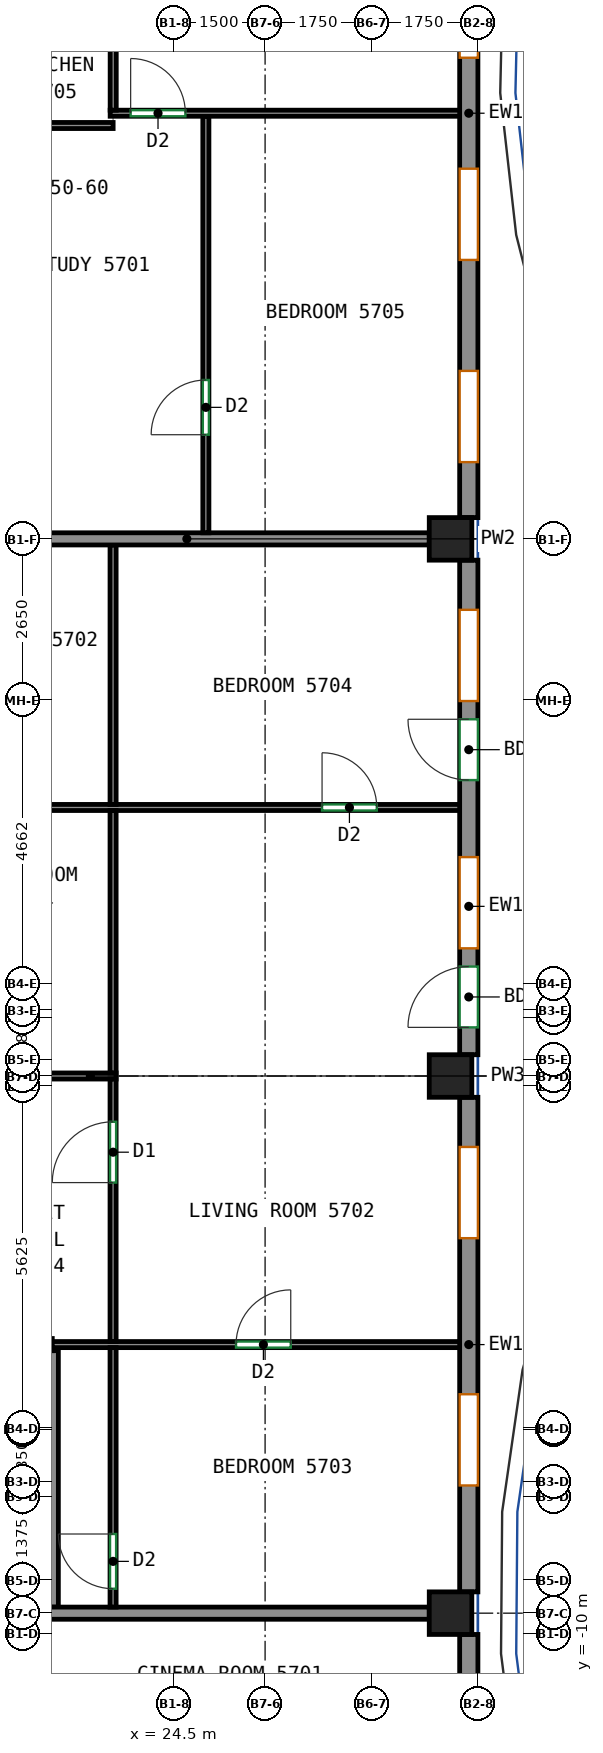
"""IFC4 building model, lengths in metres.
Left out: names, types, materials, properties, quantities, classifications, styles, units other than length and angle.
Written with IfcOpenShell. Run it as: python <this file> out.ifc"""

import sys

from ifc_helpers import new_model, si_unit, direction, frame, frame_2d, origin, origin_2d, place, context, subcontext, project, spatial, rectangle, extrude, source, transform, mapped, element, fill, save


model = new_model("IFC4")
c1 = context("Model", 3, precision=1e-05, world=origin(), true_north=direction((0.0, 1.0)))
c2 = subcontext(c1, "Body", "Model", "MODEL_VIEW")
j1 = project(units=[si_unit("LENGTHUNIT", "METRE"), si_unit("PLANEANGLEUNIT", "RADIAN")], contexts=[c1])
p1 = place(None, origin())
s1 = spatial("IfcSite", under=j1, at=p1, CompositionType="ELEMENT")
p2 = place(p1, origin())
s2 = spatial("IfcBuilding", under=s1, at=p2, CompositionType="ELEMENT")
p3 = place(p2, frame((0.0, 0.0, 239.0)))
s3 = spatial("IfcBuildingStorey", under=s2, at=p3, CompositionType="ELEMENT", Elevation=239.0)
m1 = source(origin(), c2, "Body", "SweptSolid", [
    extrude(rectangle(XDim=0.7, YDim=0.7, at=origin_2d()), origin(), (0.0, 0.0, 1.0), 3.12),
])
for number, where, z_axis, x_axis in (
    (1, (29.05, -9.667, 0.0), (0.0, 0.0, 1.0), (1.0, 0.0, 0.0)),
    (2, (29.05, -0.833, 0.0), (0.0, 0.0, 1.0), (1.0, 0.0, 0.0)),
    (3, (29.05, 8.0, 0.0), (0.0, 0.0, 1.0), (1.0, 0.0, 0.0)),
):
    element("IfcColumn", number, at=place(p3, frame(where, z_axis=z_axis, x_axis=x_axis)), inside=s3, PredefinedType="COLUMN", context=c2, shape_type="MappedRepresentation", body=[
        mapped(m1, transform((0.0, 0.0, 0.0))),
    ])
m2 = source(origin(), c2, "Body", "SweptSolid", [
    extrude(rectangle(XDim=4.315, YDim=0.3, at=frame_2d((2.158, 0.0))), origin(), (0.0, 0.0, 1.0), 3.12),
])
p4 = place(p3, frame((29.35, -14.332, 0.0), z_axis=(0.0, 0.0, 1.0), x_axis=(0.0, 1.0, 0.0)))
e4 = element("IfcWall", 4, at=p4, inside=s3, PredefinedType="SOLIDWALL", context=c2, shape_type="MappedRepresentation", body=[
    mapped(m2, transform((0.0, 0.0, 0.0))),
])
p5 = place(p4, frame((1.75, 0.0, 0.8)))
e5 = element("IfcOpeningElement", 5, at=p5, cuts=e4, PredefinedType="OPENING", context=c2, shape_type="SweptSolid", body=[
    extrude(rectangle(XDim=1.5, YDim=2.05, at=frame_2d((0.75, 1.025))), frame((0.0, 0.16, 0.0), z_axis=(0.0, -1.0, 0.0), x_axis=(1.0, 0.0, 0.0)), (0.0, 0.0, 1.0), 0.32),
])
m3 = source(origin(), c2, "Body", "SweptSolid", [
    extrude(rectangle(XDim=8.133, YDim=0.3, at=frame_2d((4.067, 0.0))), origin(), (0.0, 0.0, 1.0), 3.12),
])
p6 = place(p3, frame((29.35, -9.317, 0.0), z_axis=(0.0, 0.0, 1.0), x_axis=(0.0, 1.0, 0.0)))
e6 = element("IfcWall", 6, at=p6, inside=s3, PredefinedType="SOLIDWALL", context=c2, shape_type="MappedRepresentation", body=[
    mapped(m3, transform((0.0, 0.0, 0.0))),
])
p7 = place(p6, frame((1.75, 0.0, 0.8)))
e7 = element("IfcOpeningElement", 7, at=p7, cuts=e6, PredefinedType="OPENING", context=c2, shape_type="SweptSolid", body=[
    extrude(rectangle(XDim=1.5, YDim=2.05, at=frame_2d((0.75, 1.025))), frame((0.0, 0.16, 0.0), z_axis=(0.0, -1.0, 0.0), x_axis=(1.0, 0.0, 0.0)), (0.0, 0.0, 1.0), 0.32),
])
p8 = place(p6, frame((5.817, 0.0, 0.8)))
e8 = element("IfcOpeningElement", 8, at=p8, cuts=e6, PredefinedType="OPENING", context=c2, shape_type="SweptSolid", body=[
    extrude(rectangle(XDim=1.5, YDim=2.05, at=frame_2d((0.75, 1.025))), frame((0.0, 0.16, 0.0), z_axis=(0.0, -1.0, 0.0), x_axis=(1.0, 0.0, 0.0)), (0.0, 0.0, 1.0), 0.32),
])
p9 = place(p3, frame((29.35, -0.483, 0.0), z_axis=(0.0, 0.0, 1.0), x_axis=(0.0, 1.0, 0.0)))
e9 = element("IfcWall", 9, at=p9, inside=s3, PredefinedType="SOLIDWALL", context=c2, shape_type="MappedRepresentation", body=[
    mapped(m3, transform((0.0, 0.0, 0.0))),
])
p10 = place(p9, frame((1.75, 0.0, 0.8)))
e10 = element("IfcOpeningElement", 10, at=p10, cuts=e9, PredefinedType="OPENING", context=c2, shape_type="SweptSolid", body=[
    extrude(rectangle(XDim=1.5, YDim=2.05, at=frame_2d((0.75, 1.025))), frame((0.0, 0.16, 0.0), z_axis=(0.0, -1.0, 0.0), x_axis=(1.0, 0.0, 0.0)), (0.0, 0.0, 1.0), 0.32),
])
p11 = place(p9, frame((0.45, 0.0, 0.0)))
e11 = element("IfcOpeningElement", 11, at=p11, cuts=e9, PredefinedType="OPENING", context=c2, shape_type="SweptSolid", body=[
    extrude(rectangle(XDim=1.0, YDim=2.1, at=frame_2d((0.5, 1.05))), frame((0.0, 0.16, 0.0), z_axis=(0.0, -1.0, 0.0), x_axis=(1.0, 0.0, 0.0)), (0.0, 0.0, 1.0), 0.32),
])
p12 = place(p9, frame((5.817, 0.0, 0.8)))
e12 = element("IfcOpeningElement", 12, at=p12, cuts=e9, PredefinedType="OPENING", context=c2, shape_type="SweptSolid", body=[
    extrude(rectangle(XDim=1.5, YDim=2.05, at=frame_2d((0.75, 1.025))), frame((0.0, 0.16, 0.0), z_axis=(0.0, -1.0, 0.0), x_axis=(1.0, 0.0, 0.0)), (0.0, 0.0, 1.0), 0.32),
])
p13 = place(p9, frame((4.517, 0.0, 0.0)))
e13 = element("IfcOpeningElement", 13, at=p13, cuts=e9, PredefinedType="OPENING", context=c2, shape_type="SweptSolid", body=[
    extrude(rectangle(XDim=1.0, YDim=2.1, at=frame_2d((0.5, 1.05))), frame((0.0, 0.16, 0.0), z_axis=(0.0, -1.0, 0.0), x_axis=(1.0, 0.0, 0.0)), (0.0, 0.0, 1.0), 0.32),
])
m4 = source(origin(), c2, "Body", "SweptSolid", [
    extrude(rectangle(XDim=13.3, YDim=0.3, at=frame_2d((6.65, 0.0))), origin(), (0.0, 0.0, 1.0), 3.12),
])
p14 = place(p3, frame((29.35, 8.35, 0.0), z_axis=(0.0, 0.0, 1.0), x_axis=(0.0, 1.0, 0.0)))
e14 = element("IfcWall", 14, at=p14, inside=s3, PredefinedType="SOLIDWALL", context=c2, shape_type="MappedRepresentation", body=[
    mapped(m4, transform((0.0, 0.0, 0.0))),
])
p15 = place(p14, frame((0.913, 0.0, 0.8)))
e15 = element("IfcOpeningElement", 15, at=p15, cuts=e14, PredefinedType="OPENING", context=c2, shape_type="SweptSolid", body=[
    extrude(rectangle(XDim=1.5, YDim=2.05, at=frame_2d((0.75, 1.025))), frame((0.0, 0.16, 0.0), z_axis=(0.0, -1.0, 0.0), x_axis=(1.0, 0.0, 0.0)), (0.0, 0.0, 1.0), 0.32),
])
p16 = place(p14, frame((4.238, 0.0, 0.8)))
e16 = element("IfcOpeningElement", 16, at=p16, cuts=e14, PredefinedType="OPENING", context=c2, shape_type="SweptSolid", body=[
    extrude(rectangle(XDim=1.5, YDim=2.05, at=frame_2d((0.75, 1.025))), frame((0.0, 0.16, 0.0), z_axis=(0.0, -1.0, 0.0), x_axis=(1.0, 0.0, 0.0)), (0.0, 0.0, 1.0), 0.32),
])
p17 = place(p14, frame((7.562, 0.0, 0.8)))
e17 = element("IfcOpeningElement", 17, at=p17, cuts=e14, PredefinedType="OPENING", context=c2, shape_type="SweptSolid", body=[
    extrude(rectangle(XDim=1.5, YDim=2.05, at=frame_2d((0.75, 1.025))), frame((0.0, 0.16, 0.0), z_axis=(0.0, -1.0, 0.0), x_axis=(1.0, 0.0, 0.0)), (0.0, 0.0, 1.0), 0.32),
])
p18 = place(p14, frame((10.887, 0.0, 0.8)))
e18 = element("IfcOpeningElement", 18, at=p18, cuts=e14, PredefinedType="OPENING", context=c2, shape_type="SweptSolid", body=[
    extrude(rectangle(XDim=1.5, YDim=2.05, at=frame_2d((0.75, 1.025))), frame((0.0, 0.16, 0.0), z_axis=(0.0, -1.0, 0.0), x_axis=(1.0, 0.0, 0.0)), (0.0, 0.0, 1.0), 0.32),
])
p19 = place(p3, frame((22.5, -9.567, 0.0), z_axis=(0.0, 0.0, 1.0), x_axis=(0.0, 1.0, 0.0)))
e19 = element("IfcWall", 19, at=p19, inside=s3, PredefinedType="PARTITIONING", context=c2, shape_type="SweptSolid", body=[
    extrude(rectangle(XDim=4.217, YDim=0.2, at=frame_2d((2.108, 0.0))), origin(), (0.0, 0.0, 1.0), 3.12),
])
p20 = place(p3, frame((22.4, -9.667, 0.0), z_axis=(0.0, 0.0, 1.0), x_axis=(1.0, 0.0, 0.0)))
e20 = element("IfcWall", 20, at=p20, inside=s3, PredefinedType="PARTITIONING", context=c2, shape_type="SweptSolid", body=[
    extrude(rectangle(XDim=6.3, YDim=0.2, at=frame_2d((3.15, 0.0))), origin(), (0.0, 0.0, 1.0), 3.12),
])
p21 = place(p3, frame((22.5, -5.25, 0.0), z_axis=(0.0, 0.0, 1.0), x_axis=(1.0, 0.0, 0.0)))
e21 = element("IfcWall", 21, at=p21, inside=s3, PredefinedType="PARTITIONING", context=c2, shape_type="SweptSolid", body=[
    extrude(rectangle(XDim=6.75, YDim=0.1, at=frame_2d((3.375, 0.0))), origin(), (0.0, 0.0, 1.0), 3.12),
])
p22 = place(p21, frame((3.022, 0.0, 0.0)))
e22 = element("IfcOpeningElement", 22, at=p22, cuts=e21, PredefinedType="OPENING", context=c2, shape_type="SweptSolid", body=[
    extrude(rectangle(XDim=0.9, YDim=2.1, at=frame_2d((0.45, 1.05))), frame((0.0, 0.06, 0.0), z_axis=(0.0, -1.0, 0.0), x_axis=(1.0, 0.0, 0.0)), (0.0, 0.0, 1.0), 0.12),
])
p23 = place(p3, frame((23.5, -9.567, 0.0), z_axis=(0.0, 0.0, 1.0), x_axis=(0.0, 1.0, 0.0)))
e23 = element("IfcWall", 23, at=p23, inside=s3, PredefinedType="PARTITIONING", context=c2, shape_type="SweptSolid", body=[
    extrude(rectangle(XDim=4.267, YDim=0.1, at=frame_2d((2.133, 0.0))), origin(), (0.0, 0.0, 1.0), 3.12),
])
p24 = place(p23, frame((0.302, 0.0, 0.0)))
e24 = element("IfcOpeningElement", 24, at=p24, cuts=e23, PredefinedType="OPENING", context=c2, shape_type="SweptSolid", body=[
    extrude(rectangle(XDim=0.9, YDim=2.1, at=frame_2d((0.45, 1.05))), frame((0.0, 0.06, 0.0), z_axis=(0.0, -1.0, 0.0), x_axis=(1.0, 0.0, 0.0)), (0.0, 0.0, 1.0), 0.12),
])
p25 = place(p3, frame((23.55, -0.833, 0.0), z_axis=(0.0, 0.0, 1.0), x_axis=(-1.0, 0.0, 0.0)))
e25 = element("IfcWall", 25, at=p25, inside=s3, PredefinedType="PARTITIONING", context=c2, shape_type="SweptSolid", body=[
    extrude(rectangle(XDim=2.823, YDim=0.1, at=frame_2d((1.412, 0.0))), origin(), (0.0, 0.0, 1.0), 2.57),
])
p26 = place(p25, frame((1.216, 0.0, 0.0)))
e26 = element("IfcOpeningElement", 26, at=p26, cuts=e25, PredefinedType="OPENING", context=c2, shape_type="SweptSolid", body=[
    extrude(rectangle(XDim=1.0, YDim=2.1, at=frame_2d((0.5, 1.05))), frame((0.0, 0.06, 0.0), z_axis=(0.0, -1.0, 0.0), x_axis=(1.0, 0.0, 0.0)), (0.0, 0.0, 1.0), 0.12),
])
p27 = place(p3, frame((23.5, -5.2, 0.0), z_axis=(0.0, 0.0, 1.0), x_axis=(0.0, 1.0, 0.0)))
e27 = element("IfcWall", 27, at=p27, inside=s3, PredefinedType="PARTITIONING", context=c2, shape_type="SweptSolid", body=[
    extrude(rectangle(XDim=4.317, YDim=0.1, at=frame_2d((2.158, 0.0))), origin(), (0.0, 0.0, 1.0), 3.12),
])
p28 = place(p27, frame((2.614, 0.0, 0.0)))
e28 = element("IfcOpeningElement", 28, at=p28, cuts=e27, PredefinedType="OPENING", context=c2, shape_type="SweptSolid", body=[
    extrude(rectangle(XDim=1.0, YDim=2.1, at=frame_2d((0.5, 1.05))), frame((0.0, 0.06, 0.0), z_axis=(0.0, -1.0, 0.0), x_axis=(1.0, 0.0, 0.0)), (0.0, 0.0, 1.0), 0.12),
])
p29 = place(p3, frame((20.727, 3.583, 0.0), z_axis=(0.0, 0.0, 1.0), x_axis=(1.0, 0.0, 0.0)))
e29 = element("IfcWall", 29, at=p29, inside=s3, PredefinedType="PARTITIONING", context=c2, shape_type="SweptSolid", body=[
    extrude(rectangle(XDim=8.523, YDim=0.1, at=frame_2d((4.261, 0.0))), origin(), (0.0, 0.0, 1.0), 3.12),
])
p30 = place(p29, frame((0.41, 0.0, 0.0)))
e30 = element("IfcOpeningElement", 30, at=p30, cuts=e29, PredefinedType="OPENING", context=c2, shape_type="SweptSolid", body=[
    extrude(rectangle(XDim=0.9, YDim=2.1, at=frame_2d((0.45, 1.05))), frame((0.0, 0.06, 0.0), z_axis=(0.0, -1.0, 0.0), x_axis=(1.0, 0.0, 0.0)), (0.0, 0.0, 1.0), 0.12),
])
p31 = place(p29, frame((6.21, 0.0, 0.0)))
e31 = element("IfcOpeningElement", 31, at=p31, cuts=e29, PredefinedType="OPENING", context=c2, shape_type="SweptSolid", body=[
    extrude(rectangle(XDim=0.9, YDim=2.1, at=frame_2d((0.45, 1.05))), frame((0.0, 0.06, 0.0), z_axis=(0.0, -1.0, 0.0), x_axis=(1.0, 0.0, 0.0)), (0.0, 0.0, 1.0), 0.12),
])
p32 = place(p3, frame((23.5, -0.783, 0.0), z_axis=(0.0, 0.0, 1.0), x_axis=(0.0, 1.0, 0.0)))
e32 = element("IfcWall", 32, at=p32, inside=s3, PredefinedType="PARTITIONING", context=c2, shape_type="SweptSolid", body=[
    extrude(rectangle(XDim=4.316, YDim=0.1, at=frame_2d((2.158, 0.0))), origin(), (0.0, 0.0, 1.0), 3.12),
])
p33 = place(p3, frame((23.5, 3.633, 0.0), z_axis=(0.0, 0.0, 1.0), x_axis=(0.0, 1.0, 0.0)))
e33 = element("IfcWall", 33, at=p33, inside=s3, PredefinedType="PARTITIONING", context=c2, shape_type="SweptSolid", body=[
    extrude(rectangle(XDim=4.267, YDim=0.1, at=frame_2d((2.133, 0.0))), origin(), (0.0, 0.0, 1.0), 3.12),
])
p34 = place(p3, frame((20.727, 8.0, 0.0), z_axis=(0.0, 0.0, 1.0), x_axis=(1.0, 0.0, 0.0)))
e34 = element("IfcWall", 34, at=p34, inside=s3, PredefinedType="PARTITIONING", context=c2, shape_type="SweptSolid", body=[
    extrude(rectangle(XDim=7.973, YDim=0.2, at=frame_2d((3.986, 0.0))), origin(), (0.0, 0.0, 1.0), 2.57),
])
p35 = place(p3, frame((25.026, 8.1, 0.0), z_axis=(0.0, 0.0, 1.0), x_axis=(0.0, 1.0, 0.0)))
e35 = element("IfcWall", 35, at=p35, inside=s3, PredefinedType="PARTITIONING", context=c2, shape_type="SweptSolid", body=[
    extrude(rectangle(XDim=6.85, YDim=0.1, at=frame_2d((3.425, 0.0))), origin(), (0.0, 0.0, 1.0), 3.12),
])
p36 = place(p35, frame((1.613, 0.0, 0.0)))
e36 = element("IfcOpeningElement", 36, at=p36, cuts=e35, PredefinedType="OPENING", context=c2, shape_type="SweptSolid", body=[
    extrude(rectangle(XDim=0.9, YDim=2.1, at=frame_2d((0.45, 1.05))), frame((0.0, 0.06, 0.0), z_axis=(0.0, -1.0, 0.0), x_axis=(1.0, 0.0, 0.0)), (0.0, 0.0, 1.0), 0.12),
])
p37 = place(p3, frame((23.452, 15.0, 0.0), z_axis=(0.0, 0.0, 1.0), x_axis=(1.0, 0.0, 0.0)))
e37 = element("IfcWall", 37, at=p37, inside=s3, PredefinedType="PARTITIONING", context=c2, shape_type="SweptSolid", body=[
    extrude(rectangle(XDim=5.798, YDim=0.1, at=frame_2d((2.899, 0.0))), origin(), (0.0, 0.0, 1.0), 3.12),
])
p38 = place(p37, frame((0.337, 0.0, 0.0)))
e38 = element("IfcOpeningElement", 38, at=p38, cuts=e37, PredefinedType="OPENING", context=c2, shape_type="SweptSolid", body=[
    extrude(rectangle(XDim=0.9, YDim=2.1, at=frame_2d((0.45, 1.05))), frame((0.0, 0.06, 0.0), z_axis=(0.0, -1.0, 0.0), x_axis=(1.0, 0.0, 0.0)), (0.0, 0.0, 1.0), 0.12),
])
p39 = place(p3, frame((23.501, 14.798, 0.0), z_axis=(0.0, 0.0, 1.0), x_axis=(-1.0, 0.0, 0.0)))
e39 = element("IfcWall", 39, at=p39, inside=s3, PredefinedType="PARTITIONING", context=c2, shape_type="SweptSolid", body=[
    extrude(rectangle(XDim=1.801, YDim=0.1, at=frame_2d((0.9, 0.0))), origin(), (0.0, 0.0, 1.0), 3.12),
])
p40 = place(p3, frame((23.502, 15.05, 0.0), z_axis=(0.0, 0.0, 1.0), x_axis=(0.0, 1.0, 0.0)))
e40 = element("IfcWall", 40, at=p40, inside=s3, PredefinedType="PARTITIONING", context=c2, shape_type="SweptSolid", body=[
    extrude(rectangle(XDim=2.158, YDim=0.1, at=frame_2d((1.079, 0.0))), origin(), (0.0, 0.0, 1.0), 3.12),
])
p41 = place(p7, origin())
e41 = element("IfcWindow", 41, at=p41, inside=s3, PartitioningType="SINGLE_PANEL", PredefinedType="WINDOW", context=c2, shape_type="SweptSolid", body=[
    extrude(rectangle(XDim=1.5, YDim=2.05, at=frame_2d((0.75, 1.025))), frame((0.0, 0.03, 0.0), z_axis=(0.0, -1.0, 0.0), x_axis=(1.0, 0.0, 0.0)), (0.0, 0.0, 1.0), 0.06),
])
fill(e7, e41)
p42 = place(p8, origin())
e42 = element("IfcWindow", 42, at=p42, inside=s3, PartitioningType="SINGLE_PANEL", PredefinedType="WINDOW", context=c2, shape_type="SweptSolid", body=[
    extrude(rectangle(XDim=1.5, YDim=2.05, at=frame_2d((0.75, 1.025))), frame((0.0, 0.03, 0.0), z_axis=(0.0, -1.0, 0.0), x_axis=(1.0, 0.0, 0.0)), (0.0, 0.0, 1.0), 0.06),
])
fill(e8, e42)
p43 = place(p10, origin())
e43 = element("IfcWindow", 43, at=p43, inside=s3, PartitioningType="SINGLE_PANEL", PredefinedType="WINDOW", context=c2, shape_type="SweptSolid", body=[
    extrude(rectangle(XDim=1.5, YDim=2.05, at=frame_2d((0.75, 1.025))), frame((0.0, 0.03, 0.0), z_axis=(0.0, -1.0, 0.0), x_axis=(1.0, 0.0, 0.0)), (0.0, 0.0, 1.0), 0.06),
])
fill(e10, e43)
p44 = place(p11, origin())
e44 = element("IfcDoor", 44, at=p44, inside=s3, OperationType="SINGLE_SWING_LEFT", PredefinedType="DOOR", context=c2, shape_type="SweptSolid", body=[
    extrude(rectangle(XDim=1.0, YDim=2.1, at=frame_2d((0.5, 1.05))), frame((0.0, 0.025, 0.0), z_axis=(0.0, -1.0, 0.0), x_axis=(1.0, 0.0, 0.0)), (0.0, 0.0, 1.0), 0.05),
])
fill(e11, e44)
p45 = place(p12, origin())
e45 = element("IfcWindow", 45, at=p45, inside=s3, PartitioningType="SINGLE_PANEL", PredefinedType="WINDOW", context=c2, shape_type="SweptSolid", body=[
    extrude(rectangle(XDim=1.5, YDim=2.05, at=frame_2d((0.75, 1.025))), frame((0.0, 0.03, 0.0), z_axis=(0.0, -1.0, 0.0), x_axis=(1.0, 0.0, 0.0)), (0.0, 0.0, 1.0), 0.06),
])
fill(e12, e45)
p46 = place(p13, origin())
e46 = element("IfcDoor", 46, at=p46, inside=s3, OperationType="SINGLE_SWING_RIGHT", PredefinedType="DOOR", context=c2, shape_type="SweptSolid", body=[
    extrude(rectangle(XDim=1.0, YDim=2.1, at=frame_2d((0.5, 1.05))), frame((0.0, 0.025, 0.0), z_axis=(0.0, -1.0, 0.0), x_axis=(1.0, 0.0, 0.0)), (0.0, 0.0, 1.0), 0.05),
])
fill(e13, e46)
p47 = place(p15, origin())
e47 = element("IfcWindow", 47, at=p47, inside=s3, PartitioningType="SINGLE_PANEL", PredefinedType="WINDOW", context=c2, shape_type="SweptSolid", body=[
    extrude(rectangle(XDim=1.5, YDim=2.05, at=frame_2d((0.75, 1.025))), frame((0.0, 0.03, 0.0), z_axis=(0.0, -1.0, 0.0), x_axis=(1.0, 0.0, 0.0)), (0.0, 0.0, 1.0), 0.06),
])
fill(e15, e47)
p48 = place(p16, origin())
e48 = element("IfcWindow", 48, at=p48, inside=s3, PartitioningType="SINGLE_PANEL", PredefinedType="WINDOW", context=c2, shape_type="SweptSolid", body=[
    extrude(rectangle(XDim=1.5, YDim=2.05, at=frame_2d((0.75, 1.025))), frame((0.0, 0.03, 0.0), z_axis=(0.0, -1.0, 0.0), x_axis=(1.0, 0.0, 0.0)), (0.0, 0.0, 1.0), 0.06),
])
fill(e16, e48)
p49 = place(p17, origin())
e49 = element("IfcWindow", 49, at=p49, inside=s3, PartitioningType="SINGLE_PANEL", PredefinedType="WINDOW", context=c2, shape_type="SweptSolid", body=[
    extrude(rectangle(XDim=1.5, YDim=2.05, at=frame_2d((0.75, 1.025))), frame((0.0, 0.03, 0.0), z_axis=(0.0, -1.0, 0.0), x_axis=(1.0, 0.0, 0.0)), (0.0, 0.0, 1.0), 0.06),
])
fill(e17, e49)
p50 = place(p24, origin())
e50 = element("IfcDoor", 50, at=p50, inside=s3, OperationType="SINGLE_SWING_RIGHT", PredefinedType="DOOR", context=c2, shape_type="SweptSolid", body=[
    extrude(rectangle(XDim=0.9, YDim=2.1, at=frame_2d((0.45, 1.05))), frame((0.0, 0.025, 0.0), z_axis=(0.0, -1.0, 0.0), x_axis=(1.0, 0.0, 0.0)), (0.0, 0.0, 1.0), 0.05),
])
fill(e24, e50)
p51 = place(p22, origin())
e51 = element("IfcDoor", 51, at=p51, inside=s3, OperationType="SINGLE_SWING_RIGHT", PredefinedType="DOOR", context=c2, shape_type="SweptSolid", body=[
    extrude(rectangle(XDim=0.9, YDim=2.1, at=frame_2d((0.45, 1.05))), frame((0.0, 0.025, 0.0), z_axis=(0.0, -1.0, 0.0), x_axis=(1.0, 0.0, 0.0)), (0.0, 0.0, 1.0), 0.05),
])
fill(e22, e51)
p52 = place(p28, origin())
e52 = element("IfcDoor", 52, at=p52, inside=s3, OperationType="SINGLE_SWING_LEFT", PredefinedType="DOOR", context=c2, shape_type="SweptSolid", body=[
    extrude(rectangle(XDim=1.0, YDim=2.1, at=frame_2d((0.5, 1.05))), frame((0.0, 0.025, 0.0), z_axis=(0.0, -1.0, 0.0), x_axis=(1.0, 0.0, 0.0)), (0.0, 0.0, 1.0), 0.05),
])
fill(e28, e52)
p53 = place(p31, origin())
e53 = element("IfcDoor", 53, at=p53, inside=s3, OperationType="SINGLE_SWING_LEFT", PredefinedType="DOOR", context=c2, shape_type="SweptSolid", body=[
    extrude(rectangle(XDim=0.9, YDim=2.1, at=frame_2d((0.45, 1.05))), frame((0.0, 0.025, 0.0), z_axis=(0.0, -1.0, 0.0), x_axis=(1.0, 0.0, 0.0)), (0.0, 0.0, 1.0), 0.05),
])
fill(e31, e53)
p54 = place(p36, origin())
e54 = element("IfcDoor", 54, at=p54, inside=s3, OperationType="SINGLE_SWING_LEFT", PredefinedType="DOOR", context=c2, shape_type="SweptSolid", body=[
    extrude(rectangle(XDim=0.9, YDim=2.1, at=frame_2d((0.45, 1.05))), frame((0.0, 0.025, 0.0), z_axis=(0.0, -1.0, 0.0), x_axis=(1.0, 0.0, 0.0)), (0.0, 0.0, 1.0), 0.05),
])
fill(e36, e54)
p55 = place(p38, origin())
e55 = element("IfcDoor", 55, at=p55, inside=s3, OperationType="SINGLE_SWING_LEFT", PredefinedType="DOOR", context=c2, shape_type="SweptSolid", body=[
    extrude(rectangle(XDim=0.9, YDim=2.1, at=frame_2d((0.45, 1.05))), frame((0.0, 0.025, 0.0), z_axis=(0.0, -1.0, 0.0), x_axis=(1.0, 0.0, 0.0)), (0.0, 0.0, 1.0), 0.05),
])
fill(e38, e55)
save(model, sys.argv[1])
